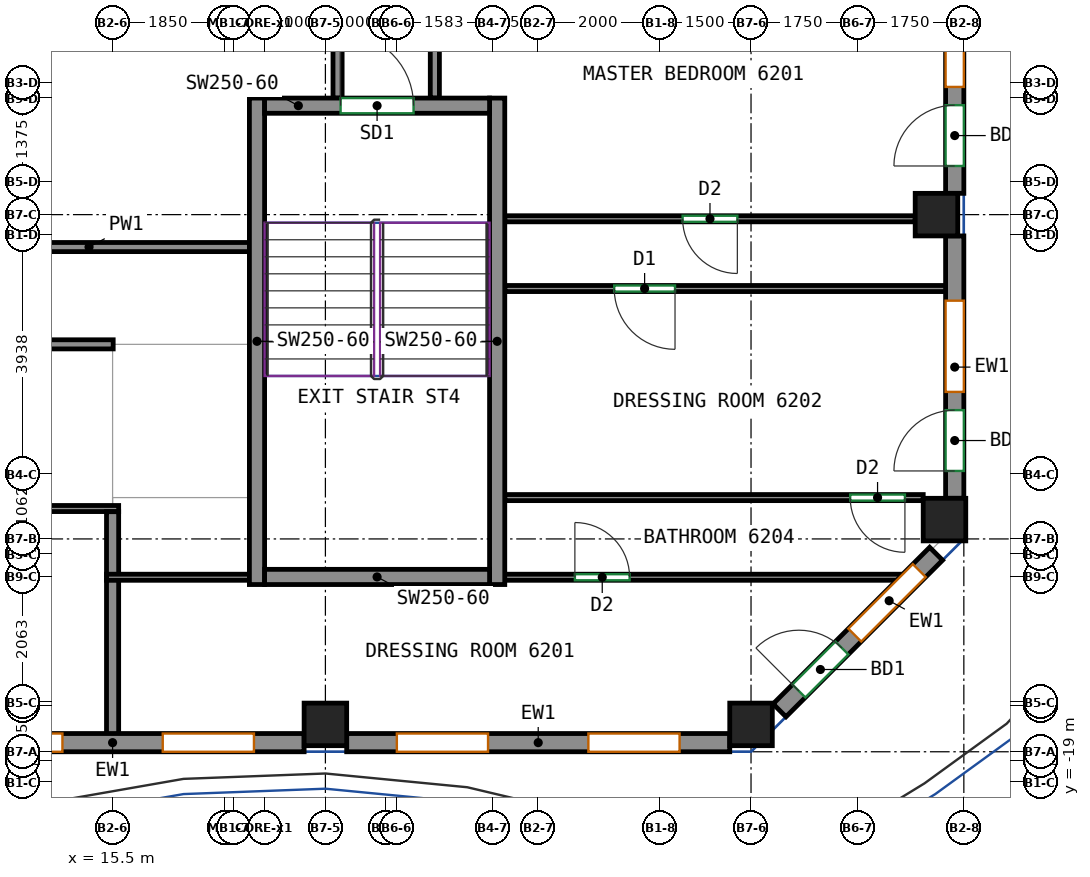
"""IFC4 building model, lengths in metres.
Left out: names, types, materials, properties, quantities, classifications, styles, units other than length and angle.
Written with IfcOpenShell. Run it as: python <this file> out.ifc"""

import sys

from ifc_helpers import new_model, si_unit, direction, frame, frame_2d, origin, origin_2d, place, context, subcontext, project, spatial, rectangle, extrude, source, transform, mapped, element, fill, save


model = new_model("IFC4")
c1 = context("Model", 3, precision=1e-05, world=origin(), true_north=direction((0.0, 1.0)))
c2 = subcontext(c1, "Body", "Model", "MODEL_VIEW")
j1 = project(units=[si_unit("LENGTHUNIT", "METRE"), si_unit("PLANEANGLEUNIT", "RADIAN")], contexts=[c1])
p1 = place(None, origin())
s1 = spatial("IfcSite", under=j1, at=p1, CompositionType="ELEMENT")
p2 = place(p1, origin())
s2 = spatial("IfcBuilding", under=s1, at=p2, CompositionType="ELEMENT")
p3 = place(p2, frame((0.0, 0.0, 256.0)))
s3 = spatial("IfcBuildingStorey", under=s2, at=p3, CompositionType="ELEMENT", Elevation=256.0)
m1 = source(origin(), c2, "Body", "SweptSolid", [
    extrude(rectangle(XDim=0.7, YDim=0.7, at=origin_2d()), origin(), (0.0, 0.0, 1.0), 3.12),
])
for number, where, z_axis, x_axis in (
    (1, (19.0, -18.05, 0.0), (0.0, 0.0, 1.0), (1.0, 0.0, 0.0)),
    (2, (26.0, -18.05, 0.0), (0.0, 0.0, 1.0), (1.0, 0.0, 0.0)),
    (3, (29.05, -9.667, 0.0), (0.0, 0.0, 1.0), (1.0, 0.0, 0.0)),
    (4, (29.182, -14.682, 0.0), (0.0, 0.0, 1.0), (1.0, 0.0, 0.0)),
):
    element("IfcColumn", number, at=place(p3, frame(where, z_axis=z_axis, x_axis=x_axis)), inside=s3, PredefinedType="COLUMN", context=c2, shape_type="MappedRepresentation", body=[
        mapped(m1, transform((0.0, 0.0, 0.0))),
    ])
m2 = source(origin(), c2, "Body", "SweptSolid", [
    extrude(rectangle(XDim=8.0, YDim=0.25, at=frame_2d((4.0, 0.0))), origin(), (0.0, 0.0, 1.0), 3.12),
])
for number, where, z_axis, x_axis in (
    (5, (17.875, -15.75, 0.0), (0.0, 0.0, 1.0), (0.0, 1.0, 0.0)),
    (6, (21.825, -15.75, 0.0), (0.0, 0.0, 1.0), (0.0, 1.0, 0.0)),
):
    element("IfcWall", number, at=place(p3, frame(where, z_axis=z_axis, x_axis=x_axis)), inside=s3, PredefinedType="SHEAR", context=c2, shape_type="MappedRepresentation", body=[
        mapped(m2, transform((0.0, 0.0, 0.0))),
    ])
m3 = source(origin(), c2, "Body", "SweptSolid", [
    extrude(rectangle(XDim=3.7, YDim=0.25, at=frame_2d((1.85, 0.0))), origin(), (0.0, 0.0, 1.0), 3.12),
])
p4 = place(p3, frame((18.0, -15.625, 0.0), z_axis=(0.0, 0.0, 1.0), x_axis=(1.0, 0.0, 0.0)))
e7 = element("IfcWall", 7, at=p4, inside=s3, PredefinedType="SHEAR", context=c2, shape_type="MappedRepresentation", body=[
    mapped(m3, transform((0.0, 0.0, 0.0))),
])
p5 = place(p3, frame((18.0, -7.875, 0.0), z_axis=(0.0, 0.0, 1.0), x_axis=(1.0, 0.0, 0.0)))
e8 = element("IfcWall", 8, at=p5, inside=s3, PredefinedType="SHEAR", context=c2, shape_type="MappedRepresentation", body=[
    mapped(m3, transform((0.0, 0.0, 0.0))),
])
p6 = place(p5, frame((1.25, 0.0, 0.0)))
e9 = element("IfcOpeningElement", 9, at=p6, cuts=e8, PredefinedType="OPENING", context=c2, shape_type="SweptSolid", body=[
    extrude(rectangle(XDim=1.2, YDim=2.1, at=frame_2d((0.6, 1.05))), frame((0.0, 0.135, 0.0), z_axis=(0.0, -1.0, 0.0), x_axis=(1.0, 0.0, 0.0)), (0.0, 0.0, 1.0), 0.27),
])
m4 = source(origin(), c2, "Body", "SweptSolid", [
    extrude(rectangle(XDim=6.3, YDim=0.3, at=frame_2d((3.15, 0.0))), origin(), (0.0, 0.0, 1.0), 3.12),
])
p7 = place(p3, frame((12.35, -18.35, 0.0), z_axis=(0.0, 0.0, 1.0), x_axis=(1.0, 0.0, 0.0)))
e10 = element("IfcWall", 10, at=p7, inside=s3, PredefinedType="SOLIDWALL", context=c2, shape_type="MappedRepresentation", body=[
    mapped(m4, transform((0.0, 0.0, 0.0))),
])
p8 = place(p7, frame((0.825, 0.0, 0.8)))
e11 = element("IfcOpeningElement", 11, at=p8, cuts=e10, PredefinedType="OPENING", context=c2, shape_type="SweptSolid", body=[
    extrude(rectangle(XDim=1.5, YDim=2.05, at=frame_2d((0.75, 1.025))), frame((0.0, 0.16, 0.0), z_axis=(0.0, -1.0, 0.0), x_axis=(1.0, 0.0, 0.0)), (0.0, 0.0, 1.0), 0.32),
])
p9 = place(p7, frame((3.975, 0.0, 0.8)))
e12 = element("IfcOpeningElement", 12, at=p9, cuts=e10, PredefinedType="OPENING", context=c2, shape_type="SweptSolid", body=[
    extrude(rectangle(XDim=1.5, YDim=2.05, at=frame_2d((0.75, 1.025))), frame((0.0, 0.16, 0.0), z_axis=(0.0, -1.0, 0.0), x_axis=(1.0, 0.0, 0.0)), (0.0, 0.0, 1.0), 0.32),
])
p10 = place(p3, frame((19.35, -18.35, 0.0), z_axis=(0.0, 0.0, 1.0), x_axis=(1.0, 0.0, 0.0)))
e13 = element("IfcWall", 13, at=p10, inside=s3, PredefinedType="SOLIDWALL", context=c2, shape_type="MappedRepresentation", body=[
    mapped(m4, transform((0.0, 0.0, 0.0))),
])
p11 = place(p10, frame((0.825, 0.0, 0.8)))
e14 = element("IfcOpeningElement", 14, at=p11, cuts=e13, PredefinedType="OPENING", context=c2, shape_type="SweptSolid", body=[
    extrude(rectangle(XDim=1.5, YDim=2.05, at=frame_2d((0.75, 1.025))), frame((0.0, 0.16, 0.0), z_axis=(0.0, -1.0, 0.0), x_axis=(1.0, 0.0, 0.0)), (0.0, 0.0, 1.0), 0.32),
])
p12 = place(p10, frame((3.975, 0.0, 0.8)))
e15 = element("IfcOpeningElement", 15, at=p12, cuts=e13, PredefinedType="OPENING", context=c2, shape_type="SweptSolid", body=[
    extrude(rectangle(XDim=1.5, YDim=2.05, at=frame_2d((0.75, 1.025))), frame((0.0, 0.16, 0.0), z_axis=(0.0, -1.0, 0.0), x_axis=(1.0, 0.0, 0.0)), (0.0, 0.0, 1.0), 0.32),
])
m5 = source(origin(), c2, "Body", "SweptSolid", [
    extrude(rectangle(XDim=3.642, YDim=0.3, at=frame_2d((1.821, 0.0))), origin(), (0.0, 0.0, 1.0), 3.12),
])
p13 = place(p3, frame((26.469, -17.819, 0.0), z_axis=(0.0, 0.0, 1.0), x_axis=(0.707106781187, 0.707106781187, 0.0)))
e16 = element("IfcWall", 16, at=p13, inside=s3, PredefinedType="SOLIDWALL", context=c2, shape_type="MappedRepresentation", body=[
    mapped(m5, transform((0.0, 0.0, 0.0))),
])
p14 = place(p13, frame((1.75, 0.0, 0.8)))
e17 = element("IfcOpeningElement", 17, at=p14, cuts=e16, PredefinedType="OPENING", context=c2, shape_type="SweptSolid", body=[
    extrude(rectangle(XDim=1.5, YDim=2.05, at=frame_2d((0.75, 1.025))), frame((0.0, 0.16, 0.0), z_axis=(0.0, -1.0, 0.0), x_axis=(1.0, 0.0, 0.0)), (0.0, 0.0, 1.0), 0.32),
])
p15 = place(p13, frame((0.45, 0.0, 0.0)))
e18 = element("IfcOpeningElement", 18, at=p15, cuts=e16, PredefinedType="OPENING", context=c2, shape_type="SweptSolid", body=[
    extrude(rectangle(XDim=1.0, YDim=2.1, at=frame_2d((0.5, 1.05))), frame((0.0, 0.16, 0.0), z_axis=(0.0, -1.0, 0.0), x_axis=(1.0, 0.0, 0.0)), (0.0, 0.0, 1.0), 0.32),
])
m6 = source(origin(), c2, "Body", "SweptSolid", [
    extrude(rectangle(XDim=4.315, YDim=0.3, at=frame_2d((2.158, 0.0))), origin(), (0.0, 0.0, 1.0), 3.12),
])
p16 = place(p3, frame((29.35, -14.332, 0.0), z_axis=(0.0, 0.0, 1.0), x_axis=(0.0, 1.0, 0.0)))
e19 = element("IfcWall", 19, at=p16, inside=s3, PredefinedType="SOLIDWALL", context=c2, shape_type="MappedRepresentation", body=[
    mapped(m6, transform((0.0, 0.0, 0.0))),
])
p17 = place(p16, frame((1.75, 0.0, 0.8)))
e20 = element("IfcOpeningElement", 20, at=p17, cuts=e19, PredefinedType="OPENING", context=c2, shape_type="SweptSolid", body=[
    extrude(rectangle(XDim=1.5, YDim=2.05, at=frame_2d((0.75, 1.025))), frame((0.0, 0.16, 0.0), z_axis=(0.0, -1.0, 0.0), x_axis=(1.0, 0.0, 0.0)), (0.0, 0.0, 1.0), 0.32),
])
p18 = place(p16, frame((0.45, 0.0, 0.0)))
e21 = element("IfcOpeningElement", 21, at=p18, cuts=e19, PredefinedType="OPENING", context=c2, shape_type="SweptSolid", body=[
    extrude(rectangle(XDim=1.0, YDim=2.1, at=frame_2d((0.5, 1.05))), frame((0.0, 0.16, 0.0), z_axis=(0.0, -1.0, 0.0), x_axis=(1.0, 0.0, 0.0)), (0.0, 0.0, 1.0), 0.32),
])
m7 = source(origin(), c2, "Body", "SweptSolid", [
    extrude(rectangle(XDim=8.133, YDim=0.3, at=frame_2d((4.067, 0.0))), origin(), (0.0, 0.0, 1.0), 3.12),
])
p19 = place(p3, frame((29.35, -9.317, 0.0), z_axis=(0.0, 0.0, 1.0), x_axis=(0.0, 1.0, 0.0)))
e22 = element("IfcWall", 22, at=p19, inside=s3, PredefinedType="SOLIDWALL", context=c2, shape_type="MappedRepresentation", body=[
    mapped(m7, transform((0.0, 0.0, 0.0))),
])
p20 = place(p19, frame((1.75, 0.0, 0.8)))
e23 = element("IfcOpeningElement", 23, at=p20, cuts=e22, PredefinedType="OPENING", context=c2, shape_type="SweptSolid", body=[
    extrude(rectangle(XDim=1.5, YDim=2.05, at=frame_2d((0.75, 1.025))), frame((0.0, 0.16, 0.0), z_axis=(0.0, -1.0, 0.0), x_axis=(1.0, 0.0, 0.0)), (0.0, 0.0, 1.0), 0.32),
])
p21 = place(p19, frame((0.45, 0.0, 0.0)))
e24 = element("IfcOpeningElement", 24, at=p21, cuts=e22, PredefinedType="OPENING", context=c2, shape_type="SweptSolid", body=[
    extrude(rectangle(XDim=1.0, YDim=2.1, at=frame_2d((0.5, 1.05))), frame((0.0, 0.16, 0.0), z_axis=(0.0, -1.0, 0.0), x_axis=(1.0, 0.0, 0.0)), (0.0, 0.0, 1.0), 0.32),
])
p22 = place(p19, frame((5.817, 0.0, 0.8)))
e25 = element("IfcOpeningElement", 25, at=p22, cuts=e22, PredefinedType="OPENING", context=c2, shape_type="SweptSolid", body=[
    extrude(rectangle(XDim=1.5, YDim=2.05, at=frame_2d((0.75, 1.025))), frame((0.0, 0.16, 0.0), z_axis=(0.0, -1.0, 0.0), x_axis=(1.0, 0.0, 0.0)), (0.0, 0.0, 1.0), 0.32),
])
p23 = place(p3, frame((-11.8, -11.8, 0.0), z_axis=(0.0, 0.0, 1.0), x_axis=(1.0, 0.0, 0.0)))
e26 = element("IfcWall", 26, at=p23, inside=s3, PredefinedType="PARTITIONING", context=c2, shape_type="SweptSolid", body=[
    extrude(rectangle(XDim=27.31, YDim=0.15, at=frame_2d((13.655, 0.0))), origin(), (0.0, 0.0, 1.0), 3.12),
])
p24 = place(p23, frame((4.104, 0.0, 0.0)))
e27 = element("IfcOpeningElement", 27, at=p24, cuts=e26, PredefinedType="OPENING", context=c2, shape_type="SweptSolid", body=[
    extrude(rectangle(XDim=1.0, YDim=2.1, at=frame_2d((0.5, 1.05))), frame((0.0, 0.085, 0.0), z_axis=(0.0, -1.0, 0.0), x_axis=(1.0, 0.0, 0.0)), (0.0, 0.0, 1.0), 0.17),
])
p25 = place(p23, frame((18.767, 0.0, 0.0)))
e28 = element("IfcOpeningElement", 28, at=p25, cuts=e26, PredefinedType="OPENING", context=c2, shape_type="SweptSolid", body=[
    extrude(rectangle(XDim=1.0, YDim=2.1, at=frame_2d((0.5, 1.05))), frame((0.0, 0.085, 0.0), z_axis=(0.0, -1.0, 0.0), x_axis=(1.0, 0.0, 0.0)), (0.0, 0.0, 1.0), 0.17),
])
p26 = place(p3, frame((20.8, -7.75, 0.0), z_axis=(0.0, 0.0, 1.0), x_axis=(0.0, 1.0, 0.0)))
e29 = element("IfcWall", 29, at=p26, inside=s3, PredefinedType="PARTITIONING", context=c2, shape_type="SweptSolid", body=[
    extrude(rectangle(XDim=1.686, YDim=0.15, at=frame_2d((0.843, 0.0))), origin(), (0.0, 0.0, 1.0), 3.12),
])
p27 = place(p3, frame((19.2, -7.75, 0.0), z_axis=(0.0, 0.0, 1.0), x_axis=(0.0, 1.0, 0.0)))
e30 = element("IfcWall", 30, at=p27, inside=s3, PredefinedType="PARTITIONING", context=c2, shape_type="SweptSolid", body=[
    extrude(rectangle(XDim=2.41, YDim=0.15, at=frame_2d((1.205, 0.0))), origin(), (0.0, 0.0, 1.0), 3.12),
])
p28 = place(p3, frame((12.475, -10.2, 0.0), z_axis=(0.0, 0.0, 1.0), x_axis=(1.0, 0.0, 0.0)))
e31 = element("IfcWall", 31, at=p28, inside=s3, PredefinedType="PARTITIONING", context=c2, shape_type="SweptSolid", body=[
    extrude(rectangle(XDim=5.275, YDim=0.15, at=frame_2d((2.637, 0.0))), origin(), (0.0, 0.0, 1.0), 3.12),
])
p29 = place(p3, frame((-9.06, -14.5, 0.0), z_axis=(0.0, 0.0, 1.0), x_axis=(1.0, 0.0, 0.0)))
e32 = element("IfcWall", 32, at=p29, inside=s3, PredefinedType="PARTITIONING", context=c2, shape_type="SweptSolid", body=[
    extrude(rectangle(XDim=24.66, YDim=0.1, at=frame_2d((12.33, 0.0))), origin(), (0.0, 0.0, 1.0), 3.12),
])
p30 = place(p29, frame((1.027, 0.0, 0.0)))
e33 = element("IfcOpeningElement", 33, at=p30, cuts=e32, PredefinedType="OPENING", context=c2, shape_type="SweptSolid", body=[
    extrude(rectangle(XDim=1.0, YDim=2.1, at=frame_2d((0.5, 1.05))), frame((0.0, 0.06, 0.0), z_axis=(0.0, -1.0, 0.0), x_axis=(1.0, 0.0, 0.0)), (0.0, 0.0, 1.0), 0.12),
])
p31 = place(p29, frame((15.732, 0.0, 0.0)))
e34 = element("IfcOpeningElement", 34, at=p31, cuts=e32, PredefinedType="OPENING", context=c2, shape_type="SweptSolid", body=[
    extrude(rectangle(XDim=1.0, YDim=2.1, at=frame_2d((0.5, 1.05))), frame((0.0, 0.06, 0.0), z_axis=(0.0, -1.0, 0.0), x_axis=(1.0, 0.0, 0.0)), (0.0, 0.0, 1.0), 0.12),
])
p32 = place(p29, frame((18.494, 0.0, 0.0)))
e35 = element("IfcOpeningElement", 35, at=p32, cuts=e32, PredefinedType="OPENING", context=c2, shape_type="SweptSolid", body=[
    extrude(rectangle(XDim=1.0, YDim=2.1, at=frame_2d((0.5, 1.05))), frame((0.0, 0.06, 0.0), z_axis=(0.0, -1.0, 0.0), x_axis=(1.0, 0.0, 0.0)), (0.0, 0.0, 1.0), 0.12),
])
p33 = place(p3, frame((15.5, -18.25, 0.0), z_axis=(0.0, 0.0, 1.0), x_axis=(0.0, 1.0, 0.0)))
e36 = element("IfcWall", 36, at=p33, inside=s3, PredefinedType="PARTITIONING", context=c2, shape_type="SweptSolid", body=[
    extrude(rectangle(XDim=2.58, YDim=0.2, at=frame_2d((1.29, 0.0))), origin(), (0.0, 0.0, 1.0), 3.12),
])
p34 = place(p3, frame((15.5, -15.59, 0.0), z_axis=(0.0, 0.0, 1.0), x_axis=(0.0, 1.0, 0.0)))
e37 = element("IfcWall", 37, at=p34, inside=s3, PredefinedType="PARTITIONING", context=c2, shape_type="SweptSolid", body=[
    extrude(rectangle(XDim=1.038, YDim=0.2, at=frame_2d((0.519, 0.0))), origin(), (0.0, 0.0, 1.0), 3.12),
])
p35 = place(p3, frame((21.9, -15.63, 0.0), z_axis=(0.0, 0.0, 1.0), x_axis=(1.0, 0.0, 0.0)))
e38 = element("IfcWall", 38, at=p35, inside=s3, PredefinedType="PARTITIONING", context=c2, shape_type="SweptSolid", body=[
    extrude(rectangle(XDim=6.616, YDim=0.1, at=frame_2d((3.308, 0.0))), origin(), (0.0, 0.0, 1.0), 3.12),
])
p36 = place(p35, frame((1.203, 0.0, 0.0)))
e39 = element("IfcOpeningElement", 39, at=p36, cuts=e38, PredefinedType="OPENING", context=c2, shape_type="SweptSolid", body=[
    extrude(rectangle(XDim=0.9, YDim=2.1, at=frame_2d((0.45, 1.05))), frame((0.0, 0.06, 0.0), z_axis=(0.0, -1.0, 0.0), x_axis=(1.0, 0.0, 0.0)), (0.0, 0.0, 1.0), 0.12),
])
p37 = place(p3, frame((15.4, -15.63, 0.0), z_axis=(0.0, 0.0, 1.0), x_axis=(1.0, 0.0, 0.0)))
e40 = element("IfcWall", 40, at=p37, inside=s3, PredefinedType="PARTITIONING", context=c2, shape_type="SweptSolid", body=[
    extrude(rectangle(XDim=2.4, YDim=0.1, at=frame_2d((1.2, 0.0))), origin(), (0.0, 0.0, 1.0), 3.12),
])
p38 = place(p3, frame((28.832, -14.32, 0.0), z_axis=(0.0, 0.0, 1.0), x_axis=(-1.0, 0.0, 0.0)))
e41 = element("IfcWall", 41, at=p38, inside=s3, PredefinedType="PARTITIONING", context=c2, shape_type="SweptSolid", body=[
    extrude(rectangle(XDim=6.882, YDim=0.1, at=frame_2d((3.441, 0.0))), origin(), (0.0, 0.0, 1.0), 3.12),
])
p39 = place(p38, frame((0.301, 0.0, 0.0)))
e42 = element("IfcOpeningElement", 42, at=p39, cuts=e41, PredefinedType="OPENING", context=c2, shape_type="SweptSolid", body=[
    extrude(rectangle(XDim=0.9, YDim=2.1, at=frame_2d((0.45, 1.05))), frame((0.0, 0.06, 0.0), z_axis=(0.0, -1.0, 0.0), x_axis=(1.0, 0.0, 0.0)), (0.0, 0.0, 1.0), 0.12),
])
p40 = place(p3, frame((29.25, -10.882, 0.0), z_axis=(0.0, 0.0, 1.0), x_axis=(-1.0, 0.0, 0.0)))
e43 = element("IfcWall", 43, at=p40, inside=s3, PredefinedType="PARTITIONING", context=c2, shape_type="SweptSolid", body=[
    extrude(rectangle(XDim=7.3, YDim=0.1, at=frame_2d((3.65, 0.0))), origin(), (0.0, 0.0, 1.0), 3.12),
])
p41 = place(p40, frame((4.5, 0.0, 0.0)))
e44 = element("IfcOpeningElement", 44, at=p41, cuts=e43, PredefinedType="OPENING", context=c2, shape_type="SweptSolid", body=[
    extrude(rectangle(XDim=1.0, YDim=2.1, at=frame_2d((0.5, 1.05))), frame((0.0, 0.06, 0.0), z_axis=(0.0, -1.0, 0.0), x_axis=(1.0, 0.0, 0.0)), (0.0, 0.0, 1.0), 0.12),
])
p42 = place(p3, frame((28.7, -9.735, 0.0), z_axis=(0.0, 0.0, 1.0), x_axis=(-1.0, 0.0, 0.0)))
e45 = element("IfcWall", 45, at=p42, inside=s3, PredefinedType="PARTITIONING", context=c2, shape_type="SweptSolid", body=[
    extrude(rectangle(XDim=6.75, YDim=0.1, at=frame_2d((3.375, 0.0))), origin(), (0.0, 0.0, 1.0), 3.12),
])
p43 = place(p42, frame((2.925, 0.0, 0.0)))
e46 = element("IfcOpeningElement", 46, at=p43, cuts=e45, PredefinedType="OPENING", context=c2, shape_type="SweptSolid", body=[
    extrude(rectangle(XDim=0.9, YDim=2.1, at=frame_2d((0.45, 1.05))), frame((0.0, 0.06, 0.0), z_axis=(0.0, -1.0, 0.0), x_axis=(1.0, 0.0, 0.0)), (0.0, 0.0, 1.0), 0.12),
])
p44 = place(p8, origin())
e47 = element("IfcWindow", 47, at=p44, inside=s3, PartitioningType="SINGLE_PANEL", PredefinedType="WINDOW", context=c2, shape_type="SweptSolid", body=[
    extrude(rectangle(XDim=1.5, YDim=2.05, at=frame_2d((0.75, 1.025))), frame((0.0, 0.03, 0.0), z_axis=(0.0, -1.0, 0.0), x_axis=(1.0, 0.0, 0.0)), (0.0, 0.0, 1.0), 0.06),
])
fill(e11, e47)
p45 = place(p9, origin())
e48 = element("IfcWindow", 48, at=p45, inside=s3, PartitioningType="SINGLE_PANEL", PredefinedType="WINDOW", context=c2, shape_type="SweptSolid", body=[
    extrude(rectangle(XDim=1.5, YDim=2.05, at=frame_2d((0.75, 1.025))), frame((0.0, 0.03, 0.0), z_axis=(0.0, -1.0, 0.0), x_axis=(1.0, 0.0, 0.0)), (0.0, 0.0, 1.0), 0.06),
])
fill(e12, e48)
p46 = place(p11, origin())
e49 = element("IfcWindow", 49, at=p46, inside=s3, PartitioningType="SINGLE_PANEL", PredefinedType="WINDOW", context=c2, shape_type="SweptSolid", body=[
    extrude(rectangle(XDim=1.5, YDim=2.05, at=frame_2d((0.75, 1.025))), frame((0.0, 0.03, 0.0), z_axis=(0.0, -1.0, 0.0), x_axis=(1.0, 0.0, 0.0)), (0.0, 0.0, 1.0), 0.06),
])
fill(e14, e49)
p47 = place(p12, origin())
e50 = element("IfcWindow", 50, at=p47, inside=s3, PartitioningType="SINGLE_PANEL", PredefinedType="WINDOW", context=c2, shape_type="SweptSolid", body=[
    extrude(rectangle(XDim=1.5, YDim=2.05, at=frame_2d((0.75, 1.025))), frame((0.0, 0.03, 0.0), z_axis=(0.0, -1.0, 0.0), x_axis=(1.0, 0.0, 0.0)), (0.0, 0.0, 1.0), 0.06),
])
fill(e15, e50)
p48 = place(p14, origin())
e51 = element("IfcWindow", 51, at=p48, inside=s3, PartitioningType="SINGLE_PANEL", PredefinedType="WINDOW", context=c2, shape_type="SweptSolid", body=[
    extrude(rectangle(XDim=1.5, YDim=2.05, at=frame_2d((0.75, 1.025))), frame((0.0, 0.03, 0.0), z_axis=(0.0, -1.0, 0.0), x_axis=(1.0, 0.0, 0.0)), (0.0, 0.0, 1.0), 0.06),
])
fill(e17, e51)
p49 = place(p15, origin())
e52 = element("IfcDoor", 52, at=p49, inside=s3, OperationType="SINGLE_SWING_LEFT", PredefinedType="DOOR", context=c2, shape_type="SweptSolid", body=[
    extrude(rectangle(XDim=1.0, YDim=2.1, at=frame_2d((0.5, 1.05))), frame((0.0, 0.025, 0.0), z_axis=(0.0, -1.0, 0.0), x_axis=(1.0, 0.0, 0.0)), (0.0, 0.0, 1.0), 0.05),
])
fill(e18, e52)
p50 = place(p17, origin())
e53 = element("IfcWindow", 53, at=p50, inside=s3, PartitioningType="SINGLE_PANEL", PredefinedType="WINDOW", context=c2, shape_type="SweptSolid", body=[
    extrude(rectangle(XDim=1.5, YDim=2.05, at=frame_2d((0.75, 1.025))), frame((0.0, 0.03, 0.0), z_axis=(0.0, -1.0, 0.0), x_axis=(1.0, 0.0, 0.0)), (0.0, 0.0, 1.0), 0.06),
])
fill(e20, e53)
p51 = place(p18, origin())
e54 = element("IfcDoor", 54, at=p51, inside=s3, OperationType="SINGLE_SWING_LEFT", PredefinedType="DOOR", context=c2, shape_type="SweptSolid", body=[
    extrude(rectangle(XDim=1.0, YDim=2.1, at=frame_2d((0.5, 1.05))), frame((0.0, 0.025, 0.0), z_axis=(0.0, -1.0, 0.0), x_axis=(1.0, 0.0, 0.0)), (0.0, 0.0, 1.0), 0.05),
])
fill(e21, e54)
p52 = place(p20, origin())
e55 = element("IfcWindow", 55, at=p52, inside=s3, PartitioningType="SINGLE_PANEL", PredefinedType="WINDOW", context=c2, shape_type="SweptSolid", body=[
    extrude(rectangle(XDim=1.5, YDim=2.05, at=frame_2d((0.75, 1.025))), frame((0.0, 0.03, 0.0), z_axis=(0.0, -1.0, 0.0), x_axis=(1.0, 0.0, 0.0)), (0.0, 0.0, 1.0), 0.06),
])
fill(e23, e55)
p53 = place(p21, origin())
e56 = element("IfcDoor", 56, at=p53, inside=s3, OperationType="SINGLE_SWING_LEFT", PredefinedType="DOOR", context=c2, shape_type="SweptSolid", body=[
    extrude(rectangle(XDim=1.0, YDim=2.1, at=frame_2d((0.5, 1.05))), frame((0.0, 0.025, 0.0), z_axis=(0.0, -1.0, 0.0), x_axis=(1.0, 0.0, 0.0)), (0.0, 0.0, 1.0), 0.05),
])
fill(e24, e56)
p54 = place(p6, origin())
e57 = element("IfcDoor", 57, at=p54, inside=s3, OperationType="DOUBLE_DOOR_SINGLE_SWING", PredefinedType="DOOR", context=c2, shape_type="SweptSolid", body=[
    extrude(rectangle(XDim=1.2, YDim=2.1, at=frame_2d((0.6, 1.05))), frame((0.0, 0.025, 0.0), z_axis=(0.0, -1.0, 0.0), x_axis=(1.0, 0.0, 0.0)), (0.0, 0.0, 1.0), 0.05),
])
fill(e9, e57)
p55 = place(p36, origin())
e58 = element("IfcDoor", 58, at=p55, inside=s3, OperationType="SINGLE_SWING_LEFT", PredefinedType="DOOR", context=c2, shape_type="SweptSolid", body=[
    extrude(rectangle(XDim=0.9, YDim=2.1, at=frame_2d((0.45, 1.05))), frame((0.0, 0.025, 0.0), z_axis=(0.0, -1.0, 0.0), x_axis=(1.0, 0.0, 0.0)), (0.0, 0.0, 1.0), 0.05),
])
fill(e39, e58)
p56 = place(p39, origin())
e59 = element("IfcDoor", 59, at=p56, inside=s3, OperationType="SINGLE_SWING_LEFT", PredefinedType="DOOR", context=c2, shape_type="SweptSolid", body=[
    extrude(rectangle(XDim=0.9, YDim=2.1, at=frame_2d((0.45, 1.05))), frame((0.0, 0.025, 0.0), z_axis=(0.0, -1.0, 0.0), x_axis=(1.0, 0.0, 0.0)), (0.0, 0.0, 1.0), 0.05),
])
fill(e42, e59)
p57 = place(p41, origin())
e60 = element("IfcDoor", 60, at=p57, inside=s3, OperationType="SINGLE_SWING_LEFT", PredefinedType="DOOR", context=c2, shape_type="SweptSolid", body=[
    extrude(rectangle(XDim=1.0, YDim=2.1, at=frame_2d((0.5, 1.05))), frame((0.0, 0.025, 0.0), z_axis=(0.0, -1.0, 0.0), x_axis=(1.0, 0.0, 0.0)), (0.0, 0.0, 1.0), 0.05),
])
fill(e44, e60)
p58 = place(p43, origin())
e61 = element("IfcDoor", 61, at=p58, inside=s3, OperationType="SINGLE_SWING_LEFT", PredefinedType="DOOR", context=c2, shape_type="SweptSolid", body=[
    extrude(rectangle(XDim=0.9, YDim=2.1, at=frame_2d((0.45, 1.05))), frame((0.0, 0.025, 0.0), z_axis=(0.0, -1.0, 0.0), x_axis=(1.0, 0.0, 0.0)), (0.0, 0.0, 1.0), 0.05),
])
fill(e46, e61)
save(model, sys.argv[1])
